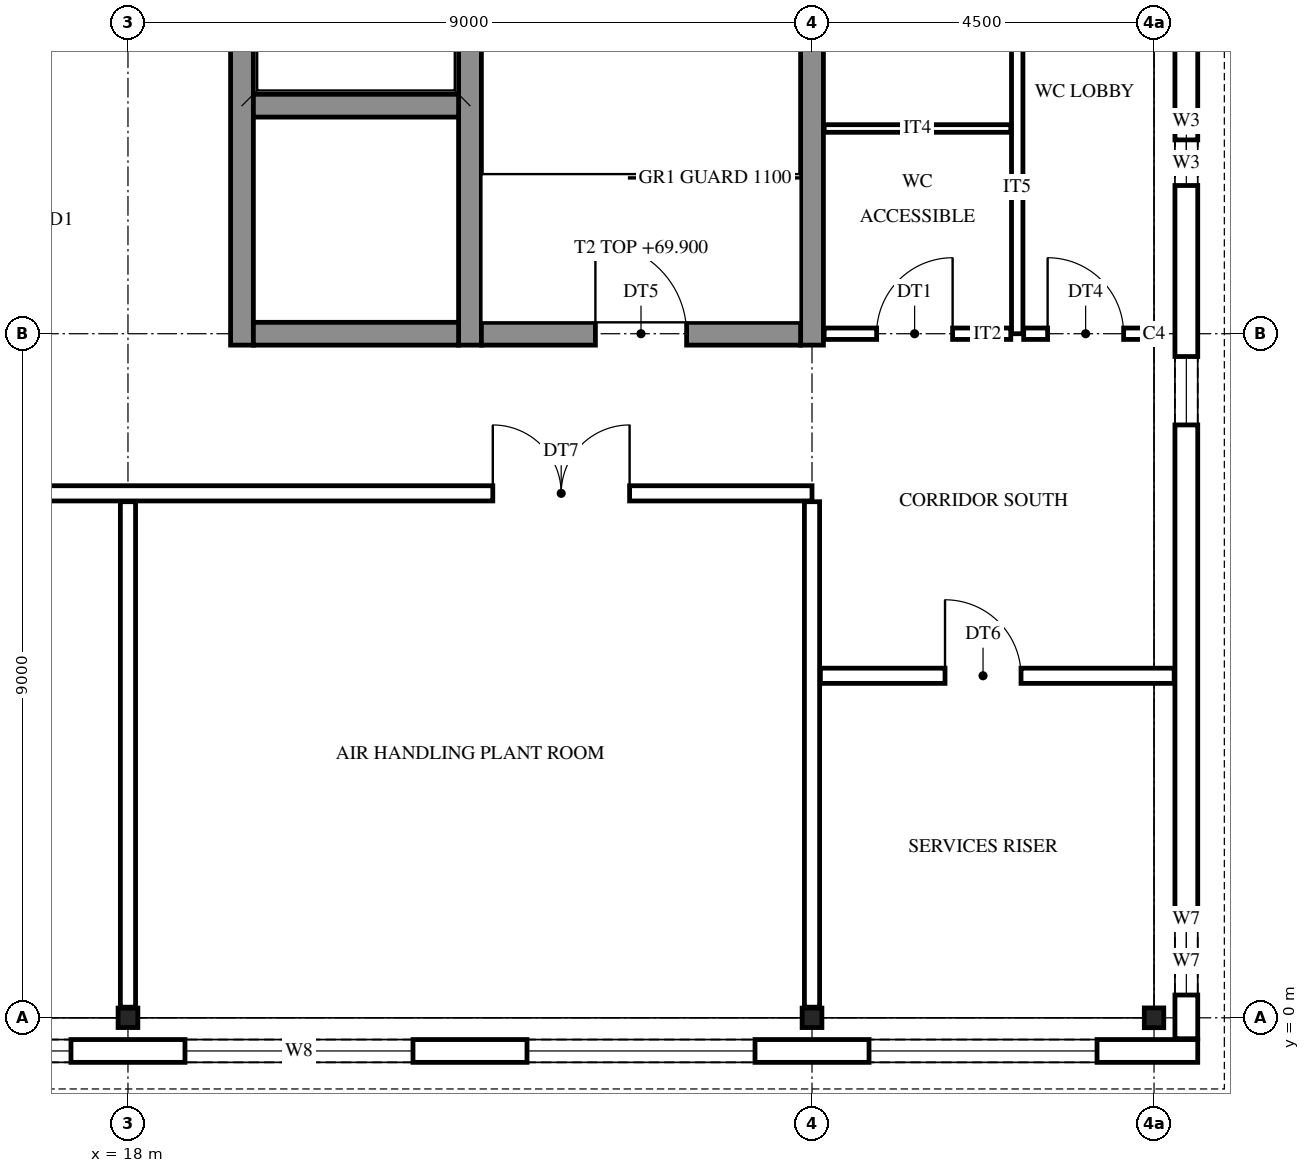
"""IFC4 building model, lengths in metres.
Left out: names, types, materials, properties, quantities, classifications, styles, units other than length and angle.
Written with IfcOpenShell. Run it as: python <this file> out.ifc"""

import sys

from ifc_helpers import new_model, si_unit, direction, frame, frame_2d, origin, origin_2d, place, context, subcontext, project, spatial, rectangle, i_section, extrude, element, fill, save


model = new_model("IFC4")
c1 = context("Model", 3, precision=1e-05, world=origin(), true_north=direction((0.0, 1.0)))
c2 = subcontext(c1, "Body", "Model", "MODEL_VIEW")
j1 = project(units=[si_unit("LENGTHUNIT", "METRE"), si_unit("PLANEANGLEUNIT", "RADIAN")], contexts=[c1])
p1 = place(None, origin())
s1 = spatial("IfcSite", under=j1, at=p1, CompositionType="ELEMENT")
p2 = place(p1, origin())
s2 = spatial("IfcBuilding", under=s1, at=p2, CompositionType="ELEMENT")
p3 = place(p2, frame((0.0, 0.0, 69.9)))
s3 = spatial("IfcBuildingStorey", under=s2, at=p3, CompositionType="ELEMENT", Elevation=69.9)
for number, where, z_axis, x_axis in (
    (1, (18.0, 0.0, 0.0), (0.0, 0.0, 1.0), (0.0, 1.0, 0.0)),
    (2, (27.0, 0.0, 0.0), (0.0, 0.0, 1.0), (0.0, 1.0, 0.0)),
    (3, (31.5, 0.0, 0.0), (0.0, 0.0, 1.0), (1.0, 0.0, 0.0)),
    (4, (31.5, 9.0, 0.0), (0.0, 0.0, 1.0), (1.0, 0.0, 0.0)),
):
    element("IfcColumn", number, at=place(p3, frame(where, z_axis=z_axis, x_axis=x_axis)), inside=s3, PredefinedType="COLUMN", context=c2, shape_type="SweptSolid", body=[
        extrude(i_section(OverallWidth=0.256, OverallDepth=0.26, WebThickness=0.01, FlangeThickness=0.017, FilletRadius=0.014, at=origin_2d()), origin(), (0.0, 0.0, 1.0), 4.5),
    ])
p4 = place(p3, frame((19.5, 8.85, 0.0), z_axis=(0.0, 0.0, 1.0), x_axis=(0.0, 1.0, 0.0)))
e5 = element("IfcWall", 5, at=p4, inside=s3, PredefinedType="SHEAR", context=c2, shape_type="SweptSolid", body=[
    extrude(rectangle(XDim=9.3, YDim=0.3, at=frame_2d((4.65, 0.0))), origin(), (0.0, 0.0, 1.0), 4.5),
])
p5 = place(p4, frame((3.95, 0.0, 0.0)))
e6 = element("IfcOpeningElement", 6, at=p5, cuts=e5, PredefinedType="OPENING", context=c2, shape_type="SweptSolid", body=[
    extrude(rectangle(XDim=1.4, YDim=2.1, at=frame_2d((0.7, 1.05))), frame((0.0, 0.16, 0.0), z_axis=(0.0, -1.0, 0.0), x_axis=(1.0, 0.0, 0.0)), (0.0, 0.0, 1.0), 0.32),
])
p6 = place(p4, frame((7.1, 0.0, 0.0)))
e7 = element("IfcOpeningElement", 7, at=p6, cuts=e5, PredefinedType="OPENING", context=c2, shape_type="SweptSolid", body=[
    extrude(rectangle(XDim=1.1, YDim=2.1, at=frame_2d((0.55, 1.05))), frame((0.0, 0.16, 0.0), z_axis=(0.0, -1.0, 0.0), x_axis=(1.0, 0.0, 0.0)), (0.0, 0.0, 1.0), 0.32),
])
for number, where, z_axis, x_axis in (
    (8, (22.5, 8.85, 0.0), (0.0, 0.0, 1.0), (0.0, 1.0, 0.0)),
    (9, (27.0, 8.85, 0.0), (0.0, 0.0, 1.0), (0.0, 1.0, 0.0)),
):
    element("IfcWall", number, at=place(p3, frame(where, z_axis=z_axis, x_axis=x_axis)), inside=s3, PredefinedType="SHEAR", context=c2, shape_type="SweptSolid", body=[
        extrude(rectangle(XDim=9.3, YDim=0.3, at=frame_2d((4.65, 0.0))), origin(), (0.0, 0.0, 1.0), 4.5),
    ])
p7 = place(p3, frame((19.65, 9.0, 0.0), z_axis=(0.0, 0.0, 1.0), x_axis=(1.0, 0.0, 0.0)))
e10 = element("IfcWall", 10, at=p7, inside=s3, PredefinedType="SHEAR", context=c2, shape_type="SweptSolid", body=[
    extrude(rectangle(XDim=2.7, YDim=0.3, at=frame_2d((1.35, 0.0))), origin(), (0.0, 0.0, 1.0), 4.5),
])
p8 = place(p3, frame((22.65, 9.0, 0.0), z_axis=(0.0, 0.0, 1.0), x_axis=(1.0, 0.0, 0.0)))
e11 = element("IfcWall", 11, at=p8, inside=s3, PredefinedType="SHEAR", context=c2, shape_type="SweptSolid", body=[
    extrude(rectangle(XDim=4.2, YDim=0.3, at=frame_2d((2.1, 0.0))), origin(), (0.0, 0.0, 1.0), 4.5),
])
p9 = place(p8, frame((1.5, 0.0, 0.0)))
e12 = element("IfcOpeningElement", 12, at=p9, cuts=e11, PredefinedType="OPENING", context=c2, shape_type="SweptSolid", body=[
    extrude(rectangle(XDim=1.2, YDim=2.1, at=frame_2d((0.6, 1.05))), frame((0.0, 0.16, 0.0), z_axis=(0.0, -1.0, 0.0), x_axis=(1.0, 0.0, 0.0)), (0.0, 0.0, 1.0), 0.32),
])
p10 = place(p3, frame((19.65, 12.0, 0.0), z_axis=(0.0, 0.0, 1.0), x_axis=(1.0, 0.0, 0.0)))
e13 = element("IfcWall", 13, at=p10, inside=s3, PredefinedType="SHEAR", context=c2, shape_type="SweptSolid", body=[
    extrude(rectangle(XDim=2.7, YDim=0.3, at=frame_2d((1.35, 0.0))), origin(), (0.0, 0.0, 1.0), 4.5),
])
p11 = place(p3, frame((32.075, -0.436, 0.0), z_axis=(0.0, 0.0, 1.0), x_axis=(-1.0, 0.0, 0.0)))
e14 = element("IfcWall", 14, at=p11, inside=s3, PredefinedType="STANDARD", context=c2, shape_type="SweptSolid", body=[
    extrude(rectangle(XDim=23.661, YDim=0.3, at=frame_2d((11.831, 0.0))), origin(), (0.0, 0.0, 1.0), 4.5),
])
p12 = place(p11, frame((19.325, 0.0, 0.6)))
e15 = element("IfcOpeningElement", 15, at=p12, cuts=e14, PredefinedType="OPENING", context=c2, shape_type="SweptSolid", body=[
    extrude(rectangle(XDim=3.0, YDim=3.1, at=frame_2d((1.5, 1.55))), frame((0.0, 0.16, 0.0), z_axis=(0.0, -1.0, 0.0), x_axis=(1.0, 0.0, 0.0)), (0.0, 0.0, 1.0), 0.32),
])
p13 = place(p11, frame((14.825, 0.0, 0.6)))
e16 = element("IfcOpeningElement", 16, at=p13, cuts=e14, PredefinedType="OPENING", context=c2, shape_type="SweptSolid", body=[
    extrude(rectangle(XDim=3.0, YDim=3.1, at=frame_2d((1.5, 1.55))), frame((0.0, 0.16, 0.0), z_axis=(0.0, -1.0, 0.0), x_axis=(1.0, 0.0, 0.0)), (0.0, 0.0, 1.0), 0.32),
])
p14 = place(p11, frame((10.325, 0.0, 0.6)))
e17 = element("IfcOpeningElement", 17, at=p14, cuts=e14, PredefinedType="OPENING", context=c2, shape_type="SweptSolid", body=[
    extrude(rectangle(XDim=3.0, YDim=3.1, at=frame_2d((1.5, 1.55))), frame((0.0, 0.16, 0.0), z_axis=(0.0, -1.0, 0.0), x_axis=(1.0, 0.0, 0.0)), (0.0, 0.0, 1.0), 0.32),
])
p15 = place(p11, frame((5.825, 0.0, 0.6)))
e18 = element("IfcOpeningElement", 18, at=p15, cuts=e14, PredefinedType="OPENING", context=c2, shape_type="SweptSolid", body=[
    extrude(rectangle(XDim=3.0, YDim=3.1, at=frame_2d((1.5, 1.55))), frame((0.0, 0.16, 0.0), z_axis=(0.0, -1.0, 0.0), x_axis=(1.0, 0.0, 0.0)), (0.0, 0.0, 1.0), 0.32),
])
p16 = place(p11, frame((1.325, 0.0, 0.6)))
e19 = element("IfcOpeningElement", 19, at=p16, cuts=e14, PredefinedType="OPENING", context=c2, shape_type="SweptSolid", body=[
    extrude(rectangle(XDim=3.0, YDim=3.1, at=frame_2d((1.5, 1.55))), frame((0.0, 0.16, 0.0), z_axis=(0.0, -1.0, 0.0), x_axis=(1.0, 0.0, 0.0)), (0.0, 0.0, 1.0), 0.32),
])
p17 = place(p3, frame((31.925, 18.275, 0.0), z_axis=(0.0, 0.0, 1.0), x_axis=(0.0, -1.0, 0.0)))
e20 = element("IfcWall", 20, at=p17, inside=s3, PredefinedType="STANDARD", context=c2, shape_type="SweptSolid", body=[
    extrude(rectangle(XDim=18.55, YDim=0.3, at=frame_2d((9.275, 0.0))), origin(), (0.0, 0.0, 1.0), 4.5),
])
p18 = place(p17, frame((17.075, 0.0, 0.6)))
e21 = element("IfcOpeningElement", 21, at=p18, cuts=e20, PredefinedType="OPENING", context=c2, shape_type="SweptSolid", body=[
    extrude(rectangle(XDim=0.9, YDim=2.3, at=frame_2d((0.45, 1.15))), frame((0.0, 0.16, 0.0), z_axis=(0.0, -1.0, 0.0), x_axis=(1.0, 0.0, 0.0)), (0.0, 0.0, 1.0), 0.32),
])
p19 = place(p17, frame((9.575, 0.0, 0.6)))
e22 = element("IfcOpeningElement", 22, at=p19, cuts=e20, PredefinedType="OPENING", context=c2, shape_type="SweptSolid", body=[
    extrude(rectangle(XDim=0.9, YDim=2.3, at=frame_2d((0.45, 1.15))), frame((0.0, 0.16, 0.0), z_axis=(0.0, -1.0, 0.0), x_axis=(1.0, 0.0, 0.0)), (0.0, 0.0, 1.0), 0.32),
])
p20 = place(p17, frame((6.725, 0.0, 1.6)))
e23 = element("IfcOpeningElement", 23, at=p20, cuts=e20, PredefinedType="OPENING", context=c2, shape_type="SweptSolid", body=[
    extrude(rectangle(XDim=0.6, YDim=0.9, at=frame_2d((0.3, 0.45))), frame((0.0, 0.16, 0.0), z_axis=(0.0, -1.0, 0.0), x_axis=(1.0, 0.0, 0.0)), (0.0, 0.0, 1.0), 0.32),
])
p21 = place(p17, frame((2.225, 0.0, 1.6)))
e24 = element("IfcOpeningElement", 24, at=p21, cuts=e20, PredefinedType="OPENING", context=c2, shape_type="SweptSolid", body=[
    extrude(rectangle(XDim=0.6, YDim=0.9, at=frame_2d((0.3, 0.45))), frame((0.0, 0.16, 0.0), z_axis=(0.0, -1.0, 0.0), x_axis=(1.0, 0.0, 0.0)), (0.0, 0.0, 1.0), 0.32),
])
p22 = place(p3, frame((32.075, -0.436, 4.5), z_axis=(0.0, 0.0, 1.0), x_axis=(-1.0, 0.0, 0.0)))
e25 = element("IfcWall", 25, at=p22, inside=s3, PredefinedType="PARAPET", context=c2, shape_type="SweptSolid", body=[
    extrude(rectangle(XDim=23.661, YDim=0.3, at=frame_2d((11.831, 0.0))), origin(), (0.0, 0.0, 1.0), 1.25),
])
p23 = place(p3, frame((31.925, 18.275, 4.5), z_axis=(0.0, 0.0, 1.0), x_axis=(0.0, -1.0, 0.0)))
e26 = element("IfcWall", 26, at=p23, inside=s3, PredefinedType="PARAPET", context=c2, shape_type="SweptSolid", body=[
    extrude(rectangle(XDim=18.55, YDim=0.3, at=frame_2d((9.275, 0.0))), origin(), (0.0, 0.0, 1.0), 1.25),
])
for number, where, z_axis, x_axis in (
    (27, (18.0, 0.14, 0.0), (0.0, 0.0, 1.0), (0.0, 1.0, 0.0)),
    (28, (27.0, 0.14, 0.0), (0.0, 0.0, 1.0), (0.0, 1.0, 0.0)),
):
    element("IfcWall", number, at=place(p3, frame(where, z_axis=z_axis, x_axis=x_axis)), inside=s3, PredefinedType="PARTITIONING", context=c2, shape_type="SweptSolid", body=[
        extrude(rectangle(XDim=6.65, YDim=0.2, at=frame_2d((3.325, 0.0))), origin(), (0.0, 0.0, 1.0), 3.822),
    ])
p24 = place(p3, frame((29.7, 9.0, 0.0), z_axis=(0.0, 0.0, 1.0), x_axis=(0.0, 1.0, 0.0)))
e29 = element("IfcWall", 29, at=p24, inside=s3, PredefinedType="PARTITIONING", context=c2, shape_type="SweptSolid", body=[
    extrude(rectangle(XDim=6.3, YDim=0.15, at=frame_2d((3.15, 0.0))), origin(), (0.0, 0.0, 1.0), 3.822),
])
p25 = place(p24, frame((4.0, 0.0, 0.0)))
e30 = element("IfcOpeningElement", 30, at=p25, cuts=e29, PredefinedType="OPENING", context=c2, shape_type="SweptSolid", body=[
    extrude(rectangle(XDim=1.0, YDim=2.1, at=frame_2d((0.5, 1.05))), frame((0.0, 0.085, 0.0), z_axis=(0.0, -1.0, 0.0), x_axis=(1.0, 0.0, 0.0)), (0.0, 0.0, 1.0), 0.17),
])
p26 = place(p3, frame((27.11, 4.5, 0.0), z_axis=(0.0, 0.0, 1.0), x_axis=(1.0, 0.0, 0.0)))
e31 = element("IfcWall", 31, at=p26, inside=s3, PredefinedType="PARTITIONING", context=c2, shape_type="SweptSolid", body=[
    extrude(rectangle(XDim=4.655, YDim=0.2, at=frame_2d((2.327, 0.0))), origin(), (0.0, 0.0, 1.0), 3.822),
])
p27 = place(p26, frame((1.64, 0.0, 0.0)))
e32 = element("IfcOpeningElement", 32, at=p27, cuts=e31, PredefinedType="OPENING", context=c2, shape_type="SweptSolid", body=[
    extrude(rectangle(XDim=1.0, YDim=2.1, at=frame_2d((0.5, 1.05))), frame((0.0, 0.11, 0.0), z_axis=(0.0, -1.0, 0.0), x_axis=(1.0, 0.0, 0.0)), (0.0, 0.0, 1.0), 0.22),
])
p28 = place(p3, frame((8.724, 6.9, 0.0), z_axis=(0.0, 0.0, 1.0), x_axis=(1.0, 0.0, 0.0)))
e33 = element("IfcWall", 33, at=p28, inside=s3, PredefinedType="PARTITIONING", context=c2, shape_type="SweptSolid", body=[
    extrude(rectangle(XDim=18.276, YDim=0.2, at=frame_2d((9.138, 0.0))), origin(), (0.0, 0.0, 1.0), 3.822),
])
p29 = place(p28, frame((3.876, 0.0, 0.0)))
e34 = element("IfcOpeningElement", 34, at=p29, cuts=e33, PredefinedType="OPENING", context=c2, shape_type="SweptSolid", body=[
    extrude(rectangle(XDim=1.8, YDim=2.1, at=frame_2d((0.9, 1.05))), frame((0.0, 0.11, 0.0), z_axis=(0.0, -1.0, 0.0), x_axis=(1.0, 0.0, 0.0)), (0.0, 0.0, 1.0), 0.22),
])
p30 = place(p28, frame((14.076, 0.0, 0.0)))
e35 = element("IfcOpeningElement", 35, at=p30, cuts=e33, PredefinedType="OPENING", context=c2, shape_type="SweptSolid", body=[
    extrude(rectangle(XDim=1.8, YDim=2.1, at=frame_2d((0.9, 1.05))), frame((0.0, 0.11, 0.0), z_axis=(0.0, -1.0, 0.0), x_axis=(1.0, 0.0, 0.0)), (0.0, 0.0, 1.0), 0.22),
])
p31 = place(p3, frame((27.16, 9.0, 0.0), z_axis=(0.0, 0.0, 1.0), x_axis=(1.0, 0.0, 0.0)))
e36 = element("IfcWall", 36, at=p31, inside=s3, PredefinedType="PARTITIONING", context=c2, shape_type="SweptSolid", body=[
    extrude(rectangle(XDim=2.455, YDim=0.15, at=frame_2d((1.228, 0.0))), origin(), (0.0, 0.0, 1.0), 3.822),
])
p32 = place(p31, frame((0.69, 0.0, 0.0)))
e37 = element("IfcOpeningElement", 37, at=p32, cuts=e36, PredefinedType="OPENING", context=c2, shape_type="SweptSolid", body=[
    extrude(rectangle(XDim=1.0, YDim=2.1, at=frame_2d((0.5, 1.05))), frame((0.0, 0.085, 0.0), z_axis=(0.0, -1.0, 0.0), x_axis=(1.0, 0.0, 0.0)), (0.0, 0.0, 1.0), 0.17),
])
p33 = place(p3, frame((29.785, 9.0, 0.0), z_axis=(0.0, 0.0, 1.0), x_axis=(1.0, 0.0, 0.0)))
e38 = element("IfcWall", 38, at=p33, inside=s3, PredefinedType="PARTITIONING", context=c2, shape_type="SweptSolid", body=[
    extrude(rectangle(XDim=1.577, YDim=0.15, at=frame_2d((0.789, 0.0))), origin(), (0.0, 0.0, 1.0), 3.822),
])
p34 = place(p33, frame((0.315, 0.0, 0.0)))
e39 = element("IfcOpeningElement", 39, at=p34, cuts=e38, PredefinedType="OPENING", context=c2, shape_type="SweptSolid", body=[
    extrude(rectangle(XDim=1.0, YDim=2.1, at=frame_2d((0.5, 1.05))), frame((0.0, 0.085, 0.0), z_axis=(0.0, -1.0, 0.0), x_axis=(1.0, 0.0, 0.0)), (0.0, 0.0, 1.0), 0.17),
])
p35 = place(p3, frame((27.16, 11.7, 0.0), z_axis=(0.0, 0.0, 1.0), x_axis=(1.0, 0.0, 0.0)))
e40 = element("IfcWall", 40, at=p35, inside=s3, PredefinedType="PARTITIONING", context=c2, shape_type="SweptSolid", body=[
    extrude(rectangle(XDim=2.455, YDim=0.1, at=frame_2d((1.228, 0.0))), origin(), (0.0, 0.0, 1.0), 3.822),
])
for number, where, z_axis, x_axis in (
    (41, (19.5, 8.85, 4.5), (0.0, 0.0, 1.0), (0.0, 1.0, 0.0)),
    (42, (22.5, 8.85, 4.5), (0.0, 0.0, 1.0), (0.0, 1.0, 0.0)),
):
    element("IfcWall", number, at=place(p3, frame(where, z_axis=z_axis, x_axis=x_axis)), inside=s3, PredefinedType="SOLIDWALL", context=c2, shape_type="SweptSolid", body=[
        extrude(rectangle(XDim=9.3, YDim=0.3, at=frame_2d((4.65, 0.0))), origin(), (0.0, 0.0, 1.0), 4.5),
    ])
for number, where, z_axis, x_axis in (
    (43, (19.65, 9.0, 4.5), (0.0, 0.0, 1.0), (1.0, 0.0, 0.0)),
    (44, (19.65, 12.0, 4.5), (0.0, 0.0, 1.0), (1.0, 0.0, 0.0)),
):
    element("IfcWall", number, at=place(p3, frame(where, z_axis=z_axis, x_axis=x_axis)), inside=s3, PredefinedType="SOLIDWALL", context=c2, shape_type="SweptSolid", body=[
        extrude(rectangle(XDim=2.7, YDim=0.3, at=frame_2d((1.35, 0.0))), origin(), (0.0, 0.0, 1.0), 4.5),
    ])
p36 = place(p13, origin())
e45 = element("IfcWindow", 45, at=p36, inside=s3, PartitioningType="SINGLE_PANEL", PredefinedType="WINDOW", context=c2, shape_type="SweptSolid", body=[
    extrude(rectangle(XDim=3.0, YDim=3.1, at=frame_2d((1.5, 1.55))), frame((0.0, 0.03, 0.0), z_axis=(0.0, -1.0, 0.0), x_axis=(1.0, 0.0, 0.0)), (0.0, 0.0, 1.0), 0.06),
])
fill(e16, e45)
p37 = place(p14, origin())
e46 = element("IfcWindow", 46, at=p37, inside=s3, PartitioningType="SINGLE_PANEL", PredefinedType="WINDOW", context=c2, shape_type="SweptSolid", body=[
    extrude(rectangle(XDim=3.0, YDim=3.1, at=frame_2d((1.5, 1.55))), frame((0.0, 0.03, 0.0), z_axis=(0.0, -1.0, 0.0), x_axis=(1.0, 0.0, 0.0)), (0.0, 0.0, 1.0), 0.06),
])
fill(e17, e46)
p38 = place(p15, origin())
e47 = element("IfcWindow", 47, at=p38, inside=s3, PartitioningType="SINGLE_PANEL", PredefinedType="WINDOW", context=c2, shape_type="SweptSolid", body=[
    extrude(rectangle(XDim=3.0, YDim=3.1, at=frame_2d((1.5, 1.55))), frame((0.0, 0.03, 0.0), z_axis=(0.0, -1.0, 0.0), x_axis=(1.0, 0.0, 0.0)), (0.0, 0.0, 1.0), 0.06),
])
fill(e18, e47)
p39 = place(p16, origin())
e48 = element("IfcWindow", 48, at=p39, inside=s3, PartitioningType="SINGLE_PANEL", PredefinedType="WINDOW", context=c2, shape_type="SweptSolid", body=[
    extrude(rectangle(XDim=3.0, YDim=3.1, at=frame_2d((1.5, 1.55))), frame((0.0, 0.03, 0.0), z_axis=(0.0, -1.0, 0.0), x_axis=(1.0, 0.0, 0.0)), (0.0, 0.0, 1.0), 0.06),
])
fill(e19, e48)
p40 = place(p18, origin())
e49 = element("IfcWindow", 49, at=p40, inside=s3, PartitioningType="SINGLE_PANEL", PredefinedType="WINDOW", context=c2, shape_type="SweptSolid", body=[
    extrude(rectangle(XDim=0.9, YDim=2.3, at=frame_2d((0.45, 1.15))), frame((0.0, 0.03, 0.0), z_axis=(0.0, -1.0, 0.0), x_axis=(1.0, 0.0, 0.0)), (0.0, 0.0, 1.0), 0.06),
])
fill(e21, e49)
p41 = place(p19, origin())
e50 = element("IfcWindow", 50, at=p41, inside=s3, PartitioningType="SINGLE_PANEL", PredefinedType="WINDOW", context=c2, shape_type="SweptSolid", body=[
    extrude(rectangle(XDim=0.9, YDim=2.3, at=frame_2d((0.45, 1.15))), frame((0.0, 0.03, 0.0), z_axis=(0.0, -1.0, 0.0), x_axis=(1.0, 0.0, 0.0)), (0.0, 0.0, 1.0), 0.06),
])
fill(e22, e50)
p42 = place(p20, origin())
e51 = element("IfcWindow", 51, at=p42, inside=s3, PartitioningType="SINGLE_PANEL", PredefinedType="WINDOW", context=c2, shape_type="SweptSolid", body=[
    extrude(rectangle(XDim=0.6, YDim=0.9, at=frame_2d((0.3, 0.45))), frame((0.0, 0.03, 0.0), z_axis=(0.0, -1.0, 0.0), x_axis=(1.0, 0.0, 0.0)), (0.0, 0.0, 1.0), 0.06),
])
fill(e23, e51)
p43 = place(p9, origin())
e52 = element("IfcDoor", 52, at=p43, inside=s3, OperationType="SINGLE_SWING_LEFT", PredefinedType="DOOR", context=c2, shape_type="SweptSolid", body=[
    extrude(rectangle(XDim=1.2, YDim=2.1, at=frame_2d((0.6, 1.05))), frame((0.0, 0.025, 0.0), z_axis=(0.0, -1.0, 0.0), x_axis=(1.0, 0.0, 0.0)), (0.0, 0.0, 1.0), 0.05),
])
fill(e12, e52)
p44 = place(p32, origin())
e53 = element("IfcDoor", 53, at=p44, inside=s3, OperationType="SINGLE_SWING_RIGHT", PredefinedType="DOOR", context=c2, shape_type="SweptSolid", body=[
    extrude(rectangle(XDim=1.0, YDim=2.1, at=frame_2d((0.5, 1.05))), frame((0.0, 0.025, 0.0), z_axis=(0.0, -1.0, 0.0), x_axis=(1.0, 0.0, 0.0)), (0.0, 0.0, 1.0), 0.05),
])
fill(e37, e53)
p45 = place(p34, origin())
e54 = element("IfcDoor", 54, at=p45, inside=s3, OperationType="SINGLE_SWING_LEFT", PredefinedType="DOOR", context=c2, shape_type="SweptSolid", body=[
    extrude(rectangle(XDim=1.0, YDim=2.1, at=frame_2d((0.5, 1.05))), frame((0.0, 0.025, 0.0), z_axis=(0.0, -1.0, 0.0), x_axis=(1.0, 0.0, 0.0)), (0.0, 0.0, 1.0), 0.05),
])
fill(e39, e54)
p46 = place(p27, frame((1.0, 0.0, 0.0), z_axis=(0.0, 0.0, 1.0), x_axis=(-1.0, 0.0, 0.0)))
e55 = element("IfcDoor", 55, at=p46, inside=s3, OperationType="SINGLE_SWING_LEFT", PredefinedType="DOOR", context=c2, shape_type="SweptSolid", body=[
    extrude(rectangle(XDim=1.0, YDim=2.1, at=frame_2d((0.5, 1.05))), frame((0.0, 0.025, 0.0), z_axis=(0.0, -1.0, 0.0), x_axis=(1.0, 0.0, 0.0)), (0.0, 0.0, 1.0), 0.05),
])
fill(e32, e55)
p47 = place(p30, frame((1.8, 0.0, 0.0), z_axis=(0.0, 0.0, 1.0), x_axis=(-1.0, 0.0, 0.0)))
e56 = element("IfcDoor", 56, at=p47, inside=s3, OperationType="DOUBLE_DOOR_SINGLE_SWING", PredefinedType="DOOR", context=c2, shape_type="SweptSolid", body=[
    extrude(rectangle(XDim=1.8, YDim=2.1, at=frame_2d((0.9, 1.05))), frame((0.0, 0.025, 0.0), z_axis=(0.0, -1.0, 0.0), x_axis=(1.0, 0.0, 0.0)), (0.0, 0.0, 1.0), 0.05),
])
fill(e35, e56)
save(model, sys.argv[1])
